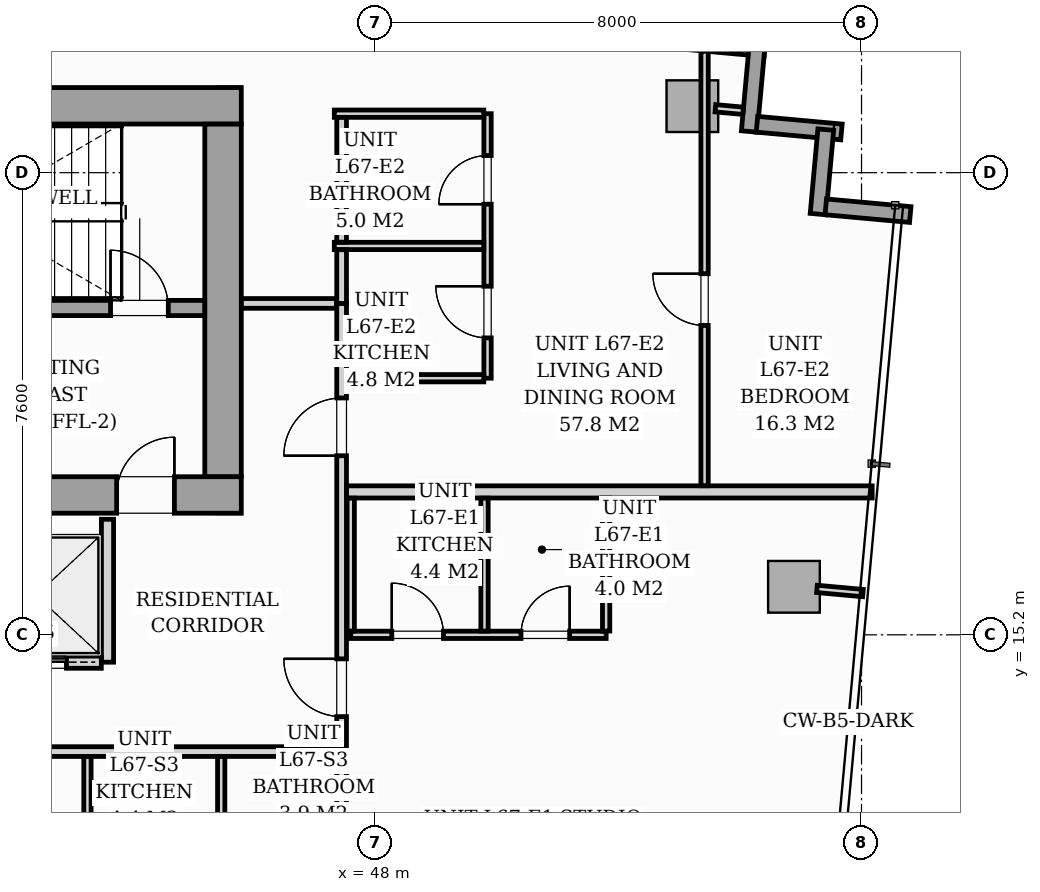
"""IFC4 building model, lengths in metres.
Left out: names, types, materials, properties, quantities, classifications, styles, units other than length and angle.
Written with IfcOpenShell. Run it as: python <this file> out.ifc"""

import sys

from ifc_helpers import new_model, si_unit, direction, frame, frame_2d, origin, origin_2d, place, context, subcontext, project, spatial, rectangle, i_section, extrude, source, transform, mapped, element, fill, save


model = new_model("IFC4")
c1 = context("Model", 3, precision=1e-05, world=origin(), true_north=direction((0.0, 1.0)))
c2 = subcontext(c1, "Body", "Model", "MODEL_VIEW")
j1 = project(units=[si_unit("LENGTHUNIT", "METRE"), si_unit("PLANEANGLEUNIT", "RADIAN")], contexts=[c1])
p1 = place(None, origin())
s1 = spatial("IfcSite", under=j1, at=p1, CompositionType="ELEMENT")
p2 = place(p1, origin())
s2 = spatial("IfcBuilding", under=s1, at=p2, CompositionType="ELEMENT")
p3 = place(p2, frame((0.0, 0.0, 233.1)))
s3 = spatial("IfcBuildingStorey", under=s2, at=p3, CompositionType="ELEMENT", Elevation=233.1)
m1 = source(origin(), c2, "Body", "SweptSolid", [
    extrude(i_section(OverallWidth=0.409, OverallDepth=0.425, WebThickness=0.033, FlangeThickness=0.052, FilletRadius=0.018, at=origin_2d()), origin(), (0.0, 0.0, 1.0), 3.296),
])
for number, where, z_axis, x_axis in (
    (1, (45.6, 17.4, 0.002), (0.0, 0.0, 1.0), (1.0, 0.0, 0.0)),
    (2, (45.6, 24.0, 0.002), (0.0, 0.0, 1.0), (1.0, 0.0, 0.0)),
):
    element("IfcColumn", number, at=place(p3, frame(where, z_axis=z_axis, x_axis=x_axis)), inside=s3, PredefinedType="PILASTER", context=c2, shape_type="MappedRepresentation", body=[
        mapped(m1, transform((0.0, 0.0, 0.0), scale=1.0)),
    ])
m2 = source(origin(), c2, "Body", "SweptSolid", [
    extrude(rectangle(XDim=0.85, YDim=0.85, at=origin_2d()), origin(), (0.0, 0.0, 1.0), 3.296),
])
for number, where, z_axis, x_axis in (
    (3, (53.218, 23.894, 0.002), (0.0, 0.0, 1.0), (0.996, -0.091, 0.0)),
    (4, (54.889, 15.99, 0.002), (0.0, 0.0, 1.0), (0.996, -0.091, 0.0)),
):
    element("IfcColumn", number, at=place(p3, frame(where, z_axis=z_axis, x_axis=x_axis)), inside=s3, PredefinedType="COLUMN", context=c2, shape_type="MappedRepresentation", body=[
        mapped(m2, transform((0.0, 0.0, 0.0), scale=1.0)),
    ])
p4 = place(p3, frame((39.839, 26.166, 0.0), z_axis=(0.0, 0.0, 1.0), x_axis=(0.995884447498, -0.090632043071, 0.0)))
e5 = element("IfcWall", 5, at=p4, inside=s3, PredefinedType="STANDARD", context=c2, shape_type="SweptSolid", body=[
    extrude(rectangle(XDim=14.63, YDim=0.26, at=frame_2d((7.315, 0.0))), origin(), (0.0, 0.0, 1.0), 3.04),
])
p5 = place(p4, frame((8.67, 0.0, 0.0)))
e6 = element("IfcOpeningElement", 6, at=p5, cuts=e5, PredefinedType="OPENING", context=c2, shape_type="SweptSolid", body=[
    extrude(rectangle(XDim=1.8, YDim=2.06, at=frame_2d((0.9, 1.03))), frame((0.0, 0.14, 0.0), z_axis=(0.0, -1.0, 0.0), x_axis=(1.0, 0.0, 0.0)), (0.0, 0.0, 1.0), 0.28),
])
p6 = place(p4, frame((0.7, 0.0, 0.65)))
e7 = element("IfcOpeningElement", 7, at=p6, cuts=e5, PredefinedType="OPENING", context=c2, shape_type="SweptSolid", body=[
    extrude(rectangle(XDim=1.6, YDim=1.5, at=frame_2d((0.8, 0.75))), frame((0.0, 0.14, 0.0), z_axis=(0.0, -1.0, 0.0), x_axis=(1.0, 0.0, 0.0)), (0.0, 0.0, 1.0), 0.28),
])
p7 = place(p3, frame((54.281, 24.866, 0.0), z_axis=(0.0, 0.0, 1.0), x_axis=(-0.090661991521, -0.995881721538, 0.0)))
e8 = element("IfcWall", 8, at=p7, inside=s3, PredefinedType="STANDARD", context=c2, shape_type="SweptSolid", body=[
    extrude(rectangle(XDim=1.395, YDim=0.26, at=frame_2d((0.698, 0.0))), origin(), (0.0, 0.0, 1.0), 3.04),
])
for number, where, z_axis, x_axis in (
    (9, (54.281, 23.596, 0.0), (0.0, 0.0, 1.0), (0.996, -0.091, 0.0)),
    (10, (55.412, 23.508, 0.0), (0.0, 0.0, 1.0), (-0.091, -0.996, 0.0)),
    (11, (55.412, 22.238, 0.0), (0.0, 0.0, 1.0), (0.996, -0.091, 0.0)),
):
    element("IfcWall", number, at=place(p3, frame(where, z_axis=z_axis, x_axis=x_axis)), inside=s3, PredefinedType="STANDARD", context=c2, shape_type="SweptSolid", body=[
        extrude(rectangle(XDim=1.395, YDim=0.26, at=frame_2d((0.698, 0.0))), origin(), (0.0, 0.0, 1.0), 3.04),
    ])
p8 = place(p3, frame((26.2, 17.5, 0.0), z_axis=(0.0, 0.0, 1.0), x_axis=(1.0, 0.0, 0.0)))
e12 = element("IfcWall", 12, at=p8, inside=s3, PredefinedType="SHEAR", context=c2, shape_type="SweptSolid", body=[
    extrude(rectangle(XDim=19.6, YDim=0.6, at=frame_2d((9.8, 0.0))), origin(), (0.0, 0.0, 1.0), 3.3),
])
p9 = place(p8, frame((0.95, 0.0, 0.0)))
e13 = element("IfcOpeningElement", 13, at=p9, cuts=e12, PredefinedType="OPENING", context=c2, shape_type="SweptSolid", body=[
    extrude(rectangle(XDim=0.95, YDim=2.06, at=frame_2d((0.475, 1.03))), frame((0.0, 0.31, 0.0), z_axis=(0.0, -1.0, 0.0), x_axis=(1.0, 0.0, 0.0)), (0.0, 0.0, 1.0), 0.62),
])
p10 = place(p8, frame((9.38, 0.0, 0.0)))
e14 = element("IfcOpeningElement", 14, at=p10, cuts=e12, PredefinedType="OPENING", context=c2, shape_type="SweptSolid", body=[
    extrude(rectangle(XDim=0.85, YDim=2.0, at=frame_2d((0.425, 1.0))), frame((0.0, 0.31, 0.0), z_axis=(0.0, -1.0, 0.0), x_axis=(1.0, 0.0, 0.0)), (0.0, 0.0, 1.0), 0.62),
])
p11 = place(p8, frame((17.55, 0.0, 0.0)))
e15 = element("IfcOpeningElement", 15, at=p11, cuts=e12, PredefinedType="OPENING", context=c2, shape_type="SweptSolid", body=[
    extrude(rectangle(XDim=0.95, YDim=2.06, at=frame_2d((0.475, 1.03))), frame((0.0, 0.31, 0.0), z_axis=(0.0, -1.0, 0.0), x_axis=(1.0, 0.0, 0.0)), (0.0, 0.0, 1.0), 0.62),
])
p12 = place(p3, frame((26.2, 23.9, 0.0), z_axis=(0.0, 0.0, 1.0), x_axis=(1.0, 0.0, 0.0)))
e16 = element("IfcWall", 16, at=p12, inside=s3, PredefinedType="SHEAR", context=c2, shape_type="SweptSolid", body=[
    extrude(rectangle(XDim=19.6, YDim=0.6, at=frame_2d((9.8, 0.0))), origin(), (0.0, 0.0, 1.0), 3.3),
])
p13 = place(p3, frame((45.5, 17.802, 0.0), z_axis=(0.0, 0.0, 1.0), x_axis=(0.0, 1.0, 0.0)))
e17 = element("IfcWall", 17, at=p13, inside=s3, PredefinedType="SHEAR", context=c2, shape_type="SweptSolid", body=[
    extrude(rectangle(XDim=5.796, YDim=0.6, at=frame_2d((2.898, 0.0))), origin(), (0.0, 0.0, 1.0), 3.3),
])
p14 = place(p3, frame((37.05, 20.575, 0.0), z_axis=(0.0, 0.0, 1.0), x_axis=(1.0, 0.0, 0.0)))
e18 = element("IfcWall", 18, at=p14, inside=s3, PredefinedType="SOLIDWALL", context=c2, shape_type="SweptSolid", body=[
    extrude(rectangle(XDim=8.148, YDim=0.25, at=frame_2d((4.074, 0.0))), origin(), (0.0, 0.0, 1.0), 3.3),
])
p15 = place(p14, frame((6.6, 0.0, 0.0)))
e19 = element("IfcOpeningElement", 19, at=p15, cuts=e18, PredefinedType="OPENING", context=c2, shape_type="SweptSolid", body=[
    extrude(rectangle(XDim=0.95, YDim=2.06, at=frame_2d((0.475, 1.03))), frame((0.0, 0.135, 0.0), z_axis=(0.0, -1.0, 0.0), x_axis=(1.0, 0.0, 0.0)), (0.0, 0.0, 1.0), 0.27),
])
p16 = place(p3, frame((43.6, 14.75, 0.0), z_axis=(0.0, 0.0, 1.0), x_axis=(0.0, 1.0, 0.0)))
e20 = element("IfcWall", 20, at=p16, inside=s3, PredefinedType="PARTITIONING", context=c2, shape_type="SweptSolid", body=[
    extrude(rectangle(XDim=2.35, YDim=0.2, at=frame_2d((1.175, 0.0))), origin(), (0.0, 0.0, 1.0), 3.04),
])
p17 = place(p3, frame((41.352, 14.75, 0.0), z_axis=(0.0, 0.0, 1.0), x_axis=(1.0, 0.0, 0.0)))
e21 = element("IfcWall", 21, at=p17, inside=s3, PredefinedType="PARTITIONING", context=c2, shape_type="SweptSolid", body=[
    extrude(rectangle(XDim=2.146, YDim=0.2, at=frame_2d((1.073, 0.0))), origin(), (0.0, 0.0, 1.0), 3.04),
])
p18 = place(p17, frame((0.523, 0.0, 0.0)))
e22 = element("IfcOpeningElement", 22, at=p18, cuts=e21, PredefinedType="OPENING", context=c2, shape_type="SweptSolid", body=[
    extrude(rectangle(XDim=1.05, YDim=2.08, at=frame_2d((0.525, 1.04))), frame((0.0, 0.11, 0.0), z_axis=(0.0, -1.0, 0.0), x_axis=(1.0, 0.0, 0.0)), (0.0, 0.0, 1.0), 0.22),
])
p19 = place(p3, frame((26.12, 13.28, 0.0), z_axis=(0.0, 0.0, 1.0), x_axis=(1.0, 0.0, 0.0)))
e23 = element("IfcWall", 23, at=p19, inside=s3, PredefinedType="PARTITIONING", context=c2, shape_type="SweptSolid", body=[
    extrude(rectangle(XDim=21.33, YDim=0.16, at=frame_2d((10.665, 0.0))), origin(), (0.0, 0.0, 1.0), 2.556),
])
p20 = place(p19, frame((4.704, 0.0, 0.0)))
e24 = element("IfcOpeningElement", 24, at=p20, cuts=e23, PredefinedType="OPENING", context=c2, shape_type="SweptSolid", body=[
    extrude(rectangle(XDim=0.95, YDim=2.06, at=frame_2d((0.475, 1.03))), frame((0.0, 0.09, 0.0), z_axis=(0.0, -1.0, 0.0), x_axis=(1.0, 0.0, 0.0)), (0.0, 0.0, 1.0), 0.18),
])
p21 = place(p19, frame((7.5, 0.0, 0.0)))
e25 = element("IfcOpeningElement", 25, at=p21, cuts=e23, PredefinedType="OPENING", context=c2, shape_type="SweptSolid", body=[
    extrude(rectangle(XDim=0.95, YDim=2.06, at=frame_2d((0.475, 1.03))), frame((0.0, 0.09, 0.0), z_axis=(0.0, -1.0, 0.0), x_axis=(1.0, 0.0, 0.0)), (0.0, 0.0, 1.0), 0.18),
])
p22 = place(p19, frame((14.976, 0.0, 0.0)))
e26 = element("IfcOpeningElement", 26, at=p22, cuts=e23, PredefinedType="OPENING", context=c2, shape_type="SweptSolid", body=[
    extrude(rectangle(XDim=0.95, YDim=2.06, at=frame_2d((0.475, 1.03))), frame((0.0, 0.09, 0.0), z_axis=(0.0, -1.0, 0.0), x_axis=(1.0, 0.0, 0.0)), (0.0, 0.0, 1.0), 0.18),
])
p23 = place(p3, frame((47.45, 7.993, 0.0), z_axis=(0.0, 0.0, 1.0), x_axis=(0.0, 1.0, 0.0)))
e27 = element("IfcWall", 27, at=p23, inside=s3, PredefinedType="PARTITIONING", context=c2, shape_type="SweptSolid", body=[
    extrude(rectangle(XDim=5.205, YDim=0.16, at=frame_2d((2.603, 0.0))), origin(), (0.0, 0.0, 1.0), 3.04),
])
p24 = place(p3, frame((47.45, 13.362, 0.0), z_axis=(0.0, 0.0, 1.0), x_axis=(0.0, 1.0, 0.0)))
e28 = element("IfcWall", 28, at=p24, inside=s3, PredefinedType="PARTITIONING", context=c2, shape_type="SweptSolid", body=[
    extrude(rectangle(XDim=7.288, YDim=0.16, at=frame_2d((3.644, 0.0))), origin(), (0.0, 0.0, 1.0), 3.04),
])
p25 = place(p24, frame((0.493, 0.0, 0.0)))
e29 = element("IfcOpeningElement", 29, at=p25, cuts=e28, PredefinedType="OPENING", context=c2, shape_type="SweptSolid", body=[
    extrude(rectangle(XDim=0.95, YDim=2.06, at=frame_2d((0.475, 1.03))), frame((0.0, 0.09, 0.0), z_axis=(0.0, -1.0, 0.0), x_axis=(1.0, 0.0, 0.0)), (0.0, 0.0, 1.0), 0.18),
])
p26 = place(p24, frame((4.783, 0.0, 0.0)))
e30 = element("IfcOpeningElement", 30, at=p26, cuts=e28, PredefinedType="OPENING", context=c2, shape_type="SweptSolid", body=[
    extrude(rectangle(XDim=0.95, YDim=2.06, at=frame_2d((0.475, 1.03))), frame((0.0, 0.09, 0.0), z_axis=(0.0, -1.0, 0.0), x_axis=(1.0, 0.0, 0.0)), (0.0, 0.0, 1.0), 0.18),
])
p27 = place(p3, frame((45.802, 20.65, 0.0), z_axis=(0.0, 0.0, 1.0), x_axis=(1.0, 0.0, 0.0)))
e31 = element("IfcWall", 31, at=p27, inside=s3, PredefinedType="PARTITIONING", context=c2, shape_type="SweptSolid", body=[
    extrude(rectangle(XDim=1.566, YDim=0.16, at=frame_2d((0.783, 0.0))), origin(), (0.0, 0.0, 1.0), 3.04),
])
for number, where, z_axis, x_axis in (
    (32, (43.27, 11.092, 0.0), (0.0, 0.0, 1.0), (0.0, 1.0, 0.0)),
    (33, (45.47, 11.092, 0.0), (0.0, 0.0, 1.0), (0.0, 1.0, 0.0)),
):
    element("IfcWall", number, at=place(p3, frame(where, z_axis=z_axis, x_axis=x_axis)), inside=s3, PredefinedType="PARTITIONING", context=c2, shape_type="SweptSolid", body=[
        extrude(rectangle(XDim=2.106, YDim=0.12, at=frame_2d((1.053, 0.0))), origin(), (0.0, 0.0, 1.0), 3.04),
    ])
p28 = place(p3, frame((47.532, 17.55, 0.0), z_axis=(0.0, 0.0, 1.0), x_axis=(1.0, 0.0, 0.0)))
e34 = element("IfcWall", 34, at=p28, inside=s3, PredefinedType="PARTITIONING", context=c2, shape_type="SweptSolid", body=[
    extrude(rectangle(XDim=8.643, YDim=0.2, at=frame_2d((4.322, 0.0))), origin(), (0.0, 0.0, 1.0), 3.04),
])
p29 = place(p3, frame((47.6, 15.2, 0.0), z_axis=(0.0, 0.0, 1.0), x_axis=(1.0, 0.0, 0.0)))
e35 = element("IfcWall", 35, at=p29, inside=s3, PredefinedType="PARTITIONING", context=c2, shape_type="SweptSolid", body=[
    extrude(rectangle(XDim=4.2, YDim=0.12, at=frame_2d((2.1, 0.0))), origin(), (0.0, 0.0, 1.0), 3.04),
])
p30 = place(p29, frame((0.675, 0.0, 0.0)))
e36 = element("IfcOpeningElement", 36, at=p30, cuts=e35, PredefinedType="OPENING", context=c2, shape_type="SweptSolid", body=[
    extrude(rectangle(XDim=0.85, YDim=2.05, at=frame_2d((0.425, 1.025))), frame((0.0, 0.07, 0.0), z_axis=(0.0, -1.0, 0.0), x_axis=(1.0, 0.0, 0.0)), (0.0, 0.0, 1.0), 0.14),
])
p31 = place(p29, frame((2.8, 0.0, 0.0)))
e37 = element("IfcOpeningElement", 37, at=p31, cuts=e35, PredefinedType="OPENING", context=c2, shape_type="SweptSolid", body=[
    extrude(rectangle(XDim=0.8, YDim=2.02, at=frame_2d((0.4, 1.01))), frame((0.0, 0.07, 0.0), z_axis=(0.0, -1.0, 0.0), x_axis=(1.0, 0.0, 0.0)), (0.0, 0.0, 1.0), 0.14),
])
for number, where, z_axis, x_axis in (
    (38, (47.6, 15.262, 0.0), (0.0, 0.0, 1.0), (0.0, 1.0, 0.0)),
    (39, (49.8, 15.262, 0.0), (0.0, 0.0, 1.0), (0.0, 1.0, 0.0)),
    (40, (51.8, 15.262, 0.0), (0.0, 0.0, 1.0), (0.0, 1.0, 0.0)),
):
    element("IfcWall", number, at=place(p3, frame(where, z_axis=z_axis, x_axis=x_axis)), inside=s3, PredefinedType="PARTITIONING", context=c2, shape_type="SweptSolid", body=[
        extrude(rectangle(XDim=2.186, YDim=0.12, at=frame_2d((1.093, 0.0))), origin(), (0.0, 0.0, 1.0), 3.04),
    ])
p32 = place(p3, frame((49.85, 19.42, 0.0), z_axis=(0.0, 0.0, 1.0), x_axis=(0.0, 1.0, 0.0)))
e41 = element("IfcWall", 41, at=p32, inside=s3, PredefinedType="PARTITIONING", context=c2, shape_type="SweptSolid", body=[
    extrude(rectangle(XDim=4.35, YDim=0.12, at=frame_2d((2.175, 0.0))), origin(), (0.0, 0.0, 1.0), 3.04),
])
p33 = place(p32, frame((0.663, 0.0, 0.0)))
e42 = element("IfcOpeningElement", 42, at=p33, cuts=e41, PredefinedType="OPENING", context=c2, shape_type="SweptSolid", body=[
    extrude(rectangle(XDim=0.85, YDim=2.05, at=frame_2d((0.425, 1.025))), frame((0.0, 0.07, 0.0), z_axis=(0.0, -1.0, 0.0), x_axis=(1.0, 0.0, 0.0)), (0.0, 0.0, 1.0), 0.14),
])
p34 = place(p32, frame((2.862, 0.0, 0.0)))
e43 = element("IfcOpeningElement", 43, at=p34, cuts=e41, PredefinedType="OPENING", context=c2, shape_type="SweptSolid", body=[
    extrude(rectangle(XDim=0.8, YDim=2.02, at=frame_2d((0.4, 1.01))), frame((0.0, 0.07, 0.0), z_axis=(0.0, -1.0, 0.0), x_axis=(1.0, 0.0, 0.0)), (0.0, 0.0, 1.0), 0.14),
])
p35 = place(p3, frame((47.33, 21.595, 0.0), z_axis=(0.0, 0.0, 1.0), x_axis=(1.0, 0.0, 0.0)))
e44 = element("IfcWall", 44, at=p35, inside=s3, PredefinedType="PARTITIONING", context=c2, shape_type="SweptSolid", body=[
    extrude(rectangle(XDim=2.458, YDim=0.12, at=frame_2d((1.229, 0.0))), origin(), (0.0, 0.0, 1.0), 3.04),
])
p36 = place(p3, frame((47.532, 19.42, 0.0), z_axis=(0.0, 0.0, 1.0), x_axis=(1.0, 0.0, 0.0)))
e45 = element("IfcWall", 45, at=p36, inside=s3, PredefinedType="PARTITIONING", context=c2, shape_type="SweptSolid", body=[
    extrude(rectangle(XDim=2.256, YDim=0.12, at=frame_2d((1.128, 0.0))), origin(), (0.0, 0.0, 1.0), 3.04),
])
p37 = place(p3, frame((47.33, 23.77, 0.0), z_axis=(0.0, 0.0, 1.0), x_axis=(1.0, 0.0, 0.0)))
e46 = element("IfcWall", 46, at=p37, inside=s3, PredefinedType="PARTITIONING", context=c2, shape_type="SweptSolid", body=[
    extrude(rectangle(XDim=2.458, YDim=0.12, at=frame_2d((1.229, 0.0))), origin(), (0.0, 0.0, 1.0), 3.04),
])
p38 = place(p3, frame((47.45, 20.65, 0.0), z_axis=(0.0, 0.0, 1.0), x_axis=(0.0, 1.0, 0.0)))
e47 = element("IfcWall", 47, at=p38, inside=s3, PredefinedType="PARTITIONING", context=c2, shape_type="SweptSolid", body=[
    extrude(rectangle(XDim=0.883, YDim=0.16, at=frame_2d((0.441, 0.0))), origin(), (0.0, 0.0, 1.0), 3.04),
])
p39 = place(p3, frame((47.45, 21.657, 0.0), z_axis=(0.0, 0.0, 1.0), x_axis=(0.0, 1.0, 0.0)))
e48 = element("IfcWall", 48, at=p39, inside=s3, PredefinedType="PARTITIONING", context=c2, shape_type="SweptSolid", body=[
    extrude(rectangle(XDim=2.051, YDim=0.16, at=frame_2d((1.025, 0.0))), origin(), (0.0, 0.0, 1.0), 3.04),
])
p40 = place(p3, frame((53.419, 17.652, 0.0), z_axis=(0.0, 0.0, 1.0), x_axis=(0.0, 1.0, 0.0)))
e49 = element("IfcWall", 49, at=p40, inside=s3, PredefinedType="PARTITIONING", context=c2, shape_type="SweptSolid", body=[
    extrude(rectangle(XDim=7.145, YDim=0.12, at=frame_2d((3.573, 0.0))), origin(), (0.0, 0.0, 1.0), 2.482),
])
p41 = place(p40, frame((2.636, 0.0, 0.0)))
e50 = element("IfcOpeningElement", 50, at=p41, cuts=e49, PredefinedType="OPENING", context=c2, shape_type="SweptSolid", body=[
    extrude(rectangle(XDim=0.85, YDim=2.05, at=frame_2d((0.425, 1.025))), frame((0.0, 0.07, 0.0), z_axis=(0.0, -1.0, 0.0), x_axis=(1.0, 0.0, 0.0)), (0.0, 0.0, 1.0), 0.14),
])
p42 = place(p3, frame((53.597, 23.859, 0.0), z_axis=(0.0, 0.0, 1.0), x_axis=(0.995884462012, -0.090631883588, 0.0)))
e51 = element("IfcWall", 51, at=p42, inside=s3, PredefinedType="PARTITIONING", context=c2, shape_type="SweptSolid", body=[
    extrude(rectangle(XDim=0.458, YDim=0.12, at=frame_2d((0.229, 0.0))), origin(), (0.0, 0.0, 1.0), 3.04),
])
p43 = place(p3, frame((55.267, 15.955, 0.0), z_axis=(0.0, 0.0, 1.0), x_axis=(0.995887938321, -0.09059367697, 0.0)))
e52 = element("IfcWall", 52, at=p43, inside=s3, PredefinedType="PARTITIONING", context=c2, shape_type="SweptSolid", body=[
    extrude(rectangle(XDim=0.76, YDim=0.12, at=frame_2d((0.38, 0.0))), origin(), (0.0, 0.0, 1.0), 3.04),
])
m3 = source(origin(), c2, "Body", "SweptSolid", [
    extrude(rectangle(XDim=0.95, YDim=2.06, at=frame_2d((0.475, 1.03))), frame((0.0, 0.025, 0.0), z_axis=(0.0, -1.0, 0.0), x_axis=(1.0, 0.0, 0.0)), (0.0, 0.0, 1.0), 0.05),
])
p44 = place(p11, origin())
e53 = element("IfcDoor", 53, at=p44, inside=s3, OperationType="SINGLE_SWING_RIGHT", PredefinedType="DOOR", context=c2, shape_type="MappedRepresentation", body=[
    mapped(m3, transform((0.0, 0.0, 0.0), scale=1.0)),
])
fill(e15, e53)
p45 = place(p15, origin())
e54 = element("IfcDoor", 54, at=p45, inside=s3, OperationType="SINGLE_SWING_LEFT", PredefinedType="DOOR", context=c2, shape_type="MappedRepresentation", body=[
    mapped(m3, transform((0.0, 0.0, 0.0), scale=1.0)),
])
fill(e19, e54)
m4 = source(origin(), c2, "Body", "SweptSolid", [
    extrude(rectangle(XDim=1.05, YDim=2.08, at=frame_2d((0.525, 1.04))), frame((0.0, 0.025, 0.0), z_axis=(0.0, -1.0, 0.0), x_axis=(1.0, 0.0, 0.0)), (0.0, 0.0, 1.0), 0.05),
])
p46 = place(p18, origin())
e55 = element("IfcDoor", 55, at=p46, inside=s3, OperationType="SLIDING_TO_RIGHT", PredefinedType="DOOR", context=c2, shape_type="MappedRepresentation", body=[
    mapped(m4, transform((0.0, 0.0, 0.0), scale=1.0)),
])
fill(e22, e55)
m5 = source(origin(), c2, "Body", "SweptSolid", [
    extrude(rectangle(XDim=0.95, YDim=2.06, at=frame_2d((0.475, 1.03))), frame((0.0, 0.025, 0.0), z_axis=(0.0, -1.0, 0.0), x_axis=(1.0, 0.0, 0.0)), (0.0, 0.0, 1.0), 0.05),
])
p47 = place(p25, origin())
e56 = element("IfcDoor", 56, at=p47, inside=s3, OperationType="SINGLE_SWING_RIGHT", PredefinedType="DOOR", context=c2, shape_type="MappedRepresentation", body=[
    mapped(m5, transform((0.0, 0.0, 0.0), scale=1.0)),
])
fill(e29, e56)
m6 = source(origin(), c2, "Body", "SweptSolid", [
    extrude(rectangle(XDim=0.85, YDim=2.05, at=frame_2d((0.425, 1.025))), frame((0.0, 0.025, 0.0), z_axis=(0.0, -1.0, 0.0), x_axis=(1.0, 0.0, 0.0)), (0.0, 0.0, 1.0), 0.05),
])
p48 = place(p30, origin())
e57 = element("IfcDoor", 57, at=p48, inside=s3, OperationType="SINGLE_SWING_LEFT", PredefinedType="DOOR", context=c2, shape_type="MappedRepresentation", body=[
    mapped(m6, transform((0.0, 0.0, 0.0), scale=1.0)),
])
fill(e36, e57)
m7 = source(origin(), c2, "Body", "SweptSolid", [
    extrude(rectangle(XDim=0.8, YDim=2.02, at=frame_2d((0.4, 1.01))), frame((0.0, 0.025, 0.0), z_axis=(0.0, -1.0, 0.0), x_axis=(1.0, 0.0, 0.0)), (0.0, 0.0, 1.0), 0.05),
])
p49 = place(p31, origin())
e58 = element("IfcDoor", 58, at=p49, inside=s3, OperationType="SINGLE_SWING_RIGHT", PredefinedType="DOOR", context=c2, shape_type="MappedRepresentation", body=[
    mapped(m7, transform((0.0, 0.0, 0.0), scale=1.0)),
])
fill(e37, e58)
p50 = place(p26, origin())
e59 = element("IfcDoor", 59, at=p50, inside=s3, OperationType="SINGLE_SWING_LEFT", PredefinedType="DOOR", context=c2, shape_type="MappedRepresentation", body=[
    mapped(m5, transform((0.0, 0.0, 0.0), scale=1.0)),
])
fill(e30, e59)
p51 = place(p33, origin())
e60 = element("IfcDoor", 60, at=p51, inside=s3, OperationType="SINGLE_SWING_RIGHT", PredefinedType="DOOR", context=c2, shape_type="MappedRepresentation", body=[
    mapped(m6, transform((0.0, 0.0, 0.0), scale=1.0)),
])
fill(e42, e60)
p52 = place(p34, origin())
e61 = element("IfcDoor", 61, at=p52, inside=s3, OperationType="SINGLE_SWING_LEFT", PredefinedType="DOOR", context=c2, shape_type="MappedRepresentation", body=[
    mapped(m7, transform((0.0, 0.0, 0.0), scale=1.0)),
])
fill(e43, e61)
p53 = place(p41, origin())
e62 = element("IfcDoor", 62, at=p53, inside=s3, OperationType="SINGLE_SWING_RIGHT", PredefinedType="DOOR", context=c2, shape_type="MappedRepresentation", body=[
    mapped(m6, transform((0.0, 0.0, 0.0), scale=1.0)),
])
fill(e50, e62)
save(model, sys.argv[1])
